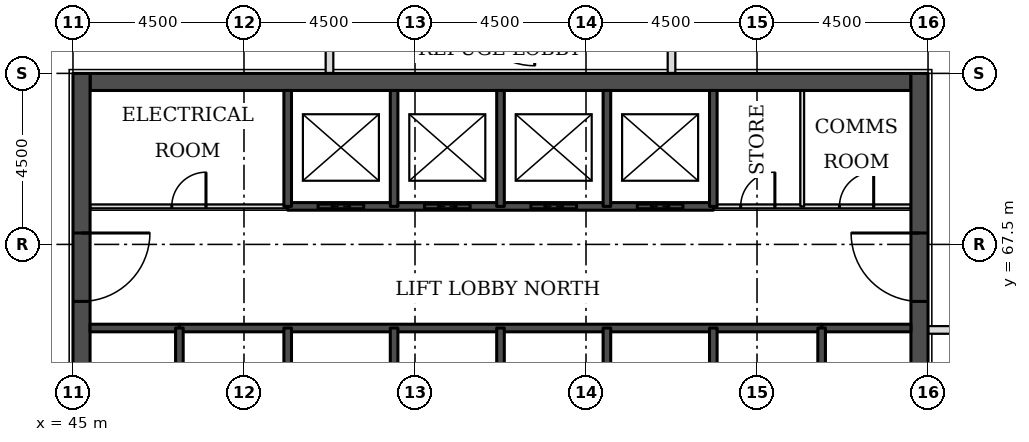
"""IFC4 building model, lengths in metres.
Left out: names, types, materials, properties, quantities, classifications, styles, units other than length and angle.
Written with IfcOpenShell. Run it as: python <this file> out.ifc"""

import sys

from ifc_helpers import new_model, si_unit, direction, frame, frame_2d, origin, place, context, subcontext, project, spatial, rectangle, extrude, element, fill, save


model = new_model("IFC4")
c1 = context("Model", 3, precision=1e-05, world=origin(), true_north=direction((0.0, 1.0)))
c2 = subcontext(c1, "Body", "Model", "MODEL_VIEW")
j1 = project(units=[si_unit("LENGTHUNIT", "METRE"), si_unit("PLANEANGLEUNIT", "RADIAN")], contexts=[c1])
p1 = place(None, origin())
s1 = spatial("IfcSite", under=j1, at=p1, CompositionType="ELEMENT")
p2 = place(p1, origin())
s2 = spatial("IfcBuilding", under=s1, at=p2, CompositionType="ELEMENT")
p3 = place(p2, frame((0.0, 0.0, 138.1)))
s3 = spatial("IfcBuildingStorey", under=s2, at=p3, CompositionType="ELEMENT", Elevation=138.1)
p4 = place(p3, frame((45.45, 71.775, 0.0), z_axis=(0.0, 0.0, 1.0), x_axis=(1.0, 0.0, 0.0)))
e1 = element("IfcWall", 1, at=p4, inside=s3, PredefinedType="SHEAR", context=c2, shape_type="SweptSolid", body=[
    extrude(rectangle(XDim=21.6, YDim=0.45, at=frame_2d((10.8, 0.0))), origin(), (0.0, 0.0, 1.0), 5.0),
])
p5 = place(p3, frame((45.225, 49.5, 0.0), z_axis=(0.0, 0.0, 1.0), x_axis=(0.0, 1.0, 0.0)))
e2 = element("IfcWall", 2, at=p5, inside=s3, PredefinedType="SHEAR", context=c2, shape_type="SweptSolid", body=[
    extrude(rectangle(XDim=22.5, YDim=0.45, at=frame_2d((11.25, 0.0))), origin(), (0.0, 0.0, 1.0), 5.0),
])
p6 = place(p5, frame((4.2, 0.0, 0.0)))
e3 = element("IfcOpeningElement", 3, at=p6, cuts=e2, PredefinedType="OPENING", context=c2, shape_type="SweptSolid", body=[
    extrude(rectangle(XDim=1.8, YDim=2.1, at=frame_2d((0.9, 1.05))), frame((0.0, 0.235, 0.0), z_axis=(0.0, -1.0, 0.0), x_axis=(1.0, 0.0, 0.0)), (0.0, 0.0, 1.0), 0.47),
])
p7 = place(p5, frame((6.9, 0.0, 0.0)))
e4 = element("IfcOpeningElement", 4, at=p7, cuts=e2, PredefinedType="OPENING", context=c2, shape_type="SweptSolid", body=[
    extrude(rectangle(XDim=1.1, YDim=2.1, at=frame_2d((0.55, 1.05))), frame((0.0, 0.235, 0.0), z_axis=(0.0, -1.0, 0.0), x_axis=(1.0, 0.0, 0.0)), (0.0, 0.0, 1.0), 0.47),
])
p8 = place(p5, frame((13.6, 0.0, 0.0)))
e5 = element("IfcOpeningElement", 5, at=p8, cuts=e2, PredefinedType="OPENING", context=c2, shape_type="SweptSolid", body=[
    extrude(rectangle(XDim=1.1, YDim=2.1, at=frame_2d((0.55, 1.05))), frame((0.0, 0.235, 0.0), z_axis=(0.0, -1.0, 0.0), x_axis=(1.0, 0.0, 0.0)), (0.0, 0.0, 1.0), 0.47),
])
p9 = place(p5, frame((16.5, 0.0, 0.0)))
e6 = element("IfcOpeningElement", 6, at=p9, cuts=e2, PredefinedType="OPENING", context=c2, shape_type="SweptSolid", body=[
    extrude(rectangle(XDim=1.8, YDim=2.1, at=frame_2d((0.9, 1.05))), frame((0.0, 0.235, 0.0), z_axis=(0.0, -1.0, 0.0), x_axis=(1.0, 0.0, 0.0)), (0.0, 0.0, 1.0), 0.47),
])
p10 = place(p3, frame((67.275, 49.5, 0.0), z_axis=(0.0, 0.0, 1.0), x_axis=(0.0, 1.0, 0.0)))
e7 = element("IfcWall", 7, at=p10, inside=s3, PredefinedType="SHEAR", context=c2, shape_type="SweptSolid", body=[
    extrude(rectangle(XDim=22.5, YDim=0.45, at=frame_2d((11.25, 0.0))), origin(), (0.0, 0.0, 1.0), 5.0),
])
p11 = place(p10, frame((4.2, 0.0, 0.0)))
e8 = element("IfcOpeningElement", 8, at=p11, cuts=e7, PredefinedType="OPENING", context=c2, shape_type="SweptSolid", body=[
    extrude(rectangle(XDim=1.8, YDim=2.1, at=frame_2d((0.9, 1.05))), frame((0.0, 0.235, 0.0), z_axis=(0.0, -1.0, 0.0), x_axis=(1.0, 0.0, 0.0)), (0.0, 0.0, 1.0), 0.47),
])
p12 = place(p10, frame((6.9, 0.0, 0.0)))
e9 = element("IfcOpeningElement", 9, at=p12, cuts=e7, PredefinedType="OPENING", context=c2, shape_type="SweptSolid", body=[
    extrude(rectangle(XDim=1.1, YDim=2.1, at=frame_2d((0.55, 1.05))), frame((0.0, 0.235, 0.0), z_axis=(0.0, -1.0, 0.0), x_axis=(1.0, 0.0, 0.0)), (0.0, 0.0, 1.0), 0.47),
])
p13 = place(p10, frame((13.6, 0.0, 0.0)))
e10 = element("IfcOpeningElement", 10, at=p13, cuts=e7, PredefinedType="OPENING", context=c2, shape_type="SweptSolid", body=[
    extrude(rectangle(XDim=1.1, YDim=2.1, at=frame_2d((0.55, 1.05))), frame((0.0, 0.235, 0.0), z_axis=(0.0, -1.0, 0.0), x_axis=(1.0, 0.0, 0.0)), (0.0, 0.0, 1.0), 0.47),
])
p14 = place(p10, frame((16.5, 0.0, 0.0)))
e11 = element("IfcOpeningElement", 11, at=p14, cuts=e7, PredefinedType="OPENING", context=c2, shape_type="SweptSolid", body=[
    extrude(rectangle(XDim=1.8, YDim=2.1, at=frame_2d((0.9, 1.05))), frame((0.0, 0.235, 0.0), z_axis=(0.0, -1.0, 0.0), x_axis=(1.0, 0.0, 0.0)), (0.0, 0.0, 1.0), 0.47),
])
for number, where, z_axis, x_axis in (
    (12, (67.5, 65.25, 0.0), (0.0, 0.0, 1.0), (1.0, 0.0, 0.0)),
    (13, (51.75, 72.0, 0.0), (0.0, 0.0, 1.0), (0.0, 1.0, 0.0)),
    (14, (60.75, 72.0, 0.0), (0.0, 0.0, 1.0), (0.0, 1.0, 0.0)),
):
    element("IfcWall", number, at=place(p3, frame(where, z_axis=z_axis, x_axis=x_axis)), inside=s3, PredefinedType="PARTITIONING", context=c2, shape_type="SweptSolid", body=[
        extrude(rectangle(XDim=2.0, YDim=0.2, at=frame_2d((1.0, 0.0))), origin(), (0.0, 0.0, 1.0), 4.85),
    ])
for number, where, z_axis, x_axis in (
    (15, (45.45, 65.3, 0.0), (0.0, 0.0, 1.0), (1.0, 0.0, 0.0)),
    (16, (64.7, 65.3, 0.0), (0.0, 0.0, 1.0), (1.0, 0.0, 0.0)),
):
    element("IfcWall", number, at=place(p3, frame(where, z_axis=z_axis, x_axis=x_axis)), inside=s3, PredefinedType="SOLIDWALL", context=c2, shape_type="SweptSolid", body=[
        extrude(rectangle(XDim=2.35, YDim=0.2, at=frame_2d((1.175, 0.0))), origin(), (0.0, 0.0, 1.0), 4.85),
    ])
p15 = place(p3, frame((47.8, 65.3, 0.0), z_axis=(0.0, 0.0, 1.0), x_axis=(1.0, 0.0, 0.0)))
e17 = element("IfcWall", 17, at=p15, inside=s3, PredefinedType="SOLIDWALL", context=c2, shape_type="SweptSolid", body=[
    extrude(rectangle(XDim=16.9, YDim=0.2, at=frame_2d((8.45, 0.0))), origin(), (0.0, 0.0, 1.0), 4.85),
])
p16 = place(p3, frame((45.45, 68.5, 0.0), z_axis=(0.0, 0.0, 1.0), x_axis=(1.0, 0.0, 0.0)))
e18 = element("IfcWall", 18, at=p16, inside=s3, PredefinedType="PARTITIONING", context=c2, shape_type="SweptSolid", body=[
    extrude(rectangle(XDim=5.2, YDim=0.1, at=frame_2d((2.6, 0.0))), origin(), (0.0, 0.0, 1.0), 4.85),
])
p17 = place(p16, frame((2.15, 0.0, 0.0)))
e19 = element("IfcOpeningElement", 19, at=p17, cuts=e18, PredefinedType="OPENING", context=c2, shape_type="SweptSolid", body=[
    extrude(rectangle(XDim=0.9, YDim=2.1, at=frame_2d((0.45, 1.05))), frame((0.0, 0.06, 0.0), z_axis=(0.0, -1.0, 0.0), x_axis=(1.0, 0.0, 0.0)), (0.0, 0.0, 1.0), 0.12),
])
p18 = place(p3, frame((61.85, 68.5, 0.0), z_axis=(0.0, 0.0, 1.0), x_axis=(1.0, 0.0, 0.0)))
e20 = element("IfcWall", 20, at=p18, inside=s3, PredefinedType="PARTITIONING", context=c2, shape_type="SweptSolid", body=[
    extrude(rectangle(XDim=5.2, YDim=0.1, at=frame_2d((2.6, 0.0))), origin(), (0.0, 0.0, 1.0), 4.85),
])
p19 = place(p18, frame((3.32, 0.0, 0.0)))
e21 = element("IfcOpeningElement", 21, at=p19, cuts=e20, PredefinedType="OPENING", context=c2, shape_type="SweptSolid", body=[
    extrude(rectangle(XDim=0.9, YDim=2.1, at=frame_2d((0.45, 1.05))), frame((0.0, 0.06, 0.0), z_axis=(0.0, -1.0, 0.0), x_axis=(1.0, 0.0, 0.0)), (0.0, 0.0, 1.0), 0.12),
])
p20 = place(p18, frame((0.72, 0.0, 0.0)))
e22 = element("IfcOpeningElement", 22, at=p20, cuts=e20, PredefinedType="OPENING", context=c2, shape_type="SweptSolid", body=[
    extrude(rectangle(XDim=0.9, YDim=2.1, at=frame_2d((0.45, 1.05))), frame((0.0, 0.06, 0.0), z_axis=(0.0, -1.0, 0.0), x_axis=(1.0, 0.0, 0.0)), (0.0, 0.0, 1.0), 0.12),
])
p21 = place(p3, frame((50.65, 68.5, 0.0), z_axis=(0.0, 0.0, 1.0), x_axis=(1.0, 0.0, 0.0)))
e23 = element("IfcWall", 23, at=p21, inside=s3, PredefinedType="SOLIDWALL", context=c2, shape_type="SweptSolid", body=[
    extrude(rectangle(XDim=11.2, YDim=0.2, at=frame_2d((5.6, 0.0))), origin(), (0.0, 0.0, 1.0), 4.85),
])
p22 = place(p21, frame((0.8, 0.0, 0.0)))
e24 = element("IfcOpeningElement", 24, at=p22, cuts=e23, PredefinedType="OPENING", context=c2, shape_type="SweptSolid", body=[
    extrude(rectangle(XDim=1.2, YDim=2.1, at=frame_2d((0.6, 1.05))), frame((0.0, 0.11, 0.0), z_axis=(0.0, -1.0, 0.0), x_axis=(1.0, 0.0, 0.0)), (0.0, 0.0, 1.0), 0.22),
])
p23 = place(p21, frame((3.6, 0.0, 0.0)))
e25 = element("IfcOpeningElement", 25, at=p23, cuts=e23, PredefinedType="OPENING", context=c2, shape_type="SweptSolid", body=[
    extrude(rectangle(XDim=1.2, YDim=2.1, at=frame_2d((0.6, 1.05))), frame((0.0, 0.11, 0.0), z_axis=(0.0, -1.0, 0.0), x_axis=(1.0, 0.0, 0.0)), (0.0, 0.0, 1.0), 0.22),
])
p24 = place(p21, frame((6.4, 0.0, 0.0)))
e26 = element("IfcOpeningElement", 26, at=p24, cuts=e23, PredefinedType="OPENING", context=c2, shape_type="SweptSolid", body=[
    extrude(rectangle(XDim=1.2, YDim=2.1, at=frame_2d((0.6, 1.05))), frame((0.0, 0.11, 0.0), z_axis=(0.0, -1.0, 0.0), x_axis=(1.0, 0.0, 0.0)), (0.0, 0.0, 1.0), 0.22),
])
p25 = place(p21, frame((9.2, 0.0, 0.0)))
e27 = element("IfcOpeningElement", 27, at=p25, cuts=e23, PredefinedType="OPENING", context=c2, shape_type="SweptSolid", body=[
    extrude(rectangle(XDim=1.2, YDim=2.1, at=frame_2d((0.6, 1.05))), frame((0.0, 0.11, 0.0), z_axis=(0.0, -1.0, 0.0), x_axis=(1.0, 0.0, 0.0)), (0.0, 0.0, 1.0), 0.22),
])
p26 = place(p3, frame((47.8, 62.0, 0.0), z_axis=(0.0, 0.0, 1.0), x_axis=(0.0, 1.0, 0.0)))
e28 = element("IfcWall", 28, at=p26, inside=s3, PredefinedType="SOLIDWALL", context=c2, shape_type="SweptSolid", body=[
    extrude(rectangle(XDim=3.3, YDim=0.2, at=frame_2d((1.65, 0.0))), origin(), (0.0, 0.0, 1.0), 4.85),
])
p27 = place(p26, frame((1.1, 0.0, 0.0)))
e29 = element("IfcOpeningElement", 29, at=p27, cuts=e28, PredefinedType="OPENING", context=c2, shape_type="SweptSolid", body=[
    extrude(rectangle(XDim=1.1, YDim=2.1, at=frame_2d((0.55, 1.05))), frame((0.0, 0.11, 0.0), z_axis=(0.0, -1.0, 0.0), x_axis=(1.0, 0.0, 0.0)), (0.0, 0.0, 1.0), 0.22),
])
p28 = place(p3, frame((50.65, 62.0, 0.0), z_axis=(0.0, 0.0, 1.0), x_axis=(0.0, 1.0, 0.0)))
e30 = element("IfcWall", 30, at=p28, inside=s3, PredefinedType="SOLIDWALL", context=c2, shape_type="SweptSolid", body=[
    extrude(rectangle(XDim=3.3, YDim=0.2, at=frame_2d((1.65, 0.0))), origin(), (0.0, 0.0, 1.0), 4.85),
])
p29 = place(p3, frame((50.65, 68.5, 0.0), z_axis=(0.0, 0.0, 1.0), x_axis=(0.0, 1.0, 0.0)))
e31 = element("IfcWall", 31, at=p29, inside=s3, PredefinedType="SOLIDWALL", context=c2, shape_type="SweptSolid", body=[
    extrude(rectangle(XDim=3.05, YDim=0.2, at=frame_2d((1.525, 0.0))), origin(), (0.0, 0.0, 1.0), 4.85),
])
p30 = place(p3, frame((53.45, 62.5, 0.0), z_axis=(0.0, 0.0, 1.0), x_axis=(0.0, 1.0, 0.0)))
e32 = element("IfcWall", 32, at=p30, inside=s3, PredefinedType="SOLIDWALL", context=c2, shape_type="SweptSolid", body=[
    extrude(rectangle(XDim=2.8, YDim=0.2, at=frame_2d((1.4, 0.0))), origin(), (0.0, 0.0, 1.0), 4.85),
])
p31 = place(p3, frame((53.45, 68.5, 0.0), z_axis=(0.0, 0.0, 1.0), x_axis=(0.0, 1.0, 0.0)))
e33 = element("IfcWall", 33, at=p31, inside=s3, PredefinedType="SOLIDWALL", context=c2, shape_type="SweptSolid", body=[
    extrude(rectangle(XDim=3.05, YDim=0.2, at=frame_2d((1.525, 0.0))), origin(), (0.0, 0.0, 1.0), 4.85),
])
p32 = place(p3, frame((56.25, 62.5, 0.0), z_axis=(0.0, 0.0, 1.0), x_axis=(0.0, 1.0, 0.0)))
e34 = element("IfcWall", 34, at=p32, inside=s3, PredefinedType="SOLIDWALL", context=c2, shape_type="SweptSolid", body=[
    extrude(rectangle(XDim=2.8, YDim=0.2, at=frame_2d((1.4, 0.0))), origin(), (0.0, 0.0, 1.0), 4.85),
])
p33 = place(p3, frame((56.25, 68.5, 0.0), z_axis=(0.0, 0.0, 1.0), x_axis=(0.0, 1.0, 0.0)))
e35 = element("IfcWall", 35, at=p33, inside=s3, PredefinedType="SOLIDWALL", context=c2, shape_type="SweptSolid", body=[
    extrude(rectangle(XDim=3.05, YDim=0.2, at=frame_2d((1.525, 0.0))), origin(), (0.0, 0.0, 1.0), 4.85),
])
p34 = place(p3, frame((59.05, 62.5, 0.0), z_axis=(0.0, 0.0, 1.0), x_axis=(0.0, 1.0, 0.0)))
e36 = element("IfcWall", 36, at=p34, inside=s3, PredefinedType="SOLIDWALL", context=c2, shape_type="SweptSolid", body=[
    extrude(rectangle(XDim=2.8, YDim=0.2, at=frame_2d((1.4, 0.0))), origin(), (0.0, 0.0, 1.0), 4.85),
])
p35 = place(p3, frame((59.05, 68.5, 0.0), z_axis=(0.0, 0.0, 1.0), x_axis=(0.0, 1.0, 0.0)))
e37 = element("IfcWall", 37, at=p35, inside=s3, PredefinedType="SOLIDWALL", context=c2, shape_type="SweptSolid", body=[
    extrude(rectangle(XDim=3.05, YDim=0.2, at=frame_2d((1.525, 0.0))), origin(), (0.0, 0.0, 1.0), 4.85),
])
p36 = place(p3, frame((61.85, 62.0, 0.0), z_axis=(0.0, 0.0, 1.0), x_axis=(0.0, 1.0, 0.0)))
e38 = element("IfcWall", 38, at=p36, inside=s3, PredefinedType="SOLIDWALL", context=c2, shape_type="SweptSolid", body=[
    extrude(rectangle(XDim=3.3, YDim=0.2, at=frame_2d((1.65, 0.0))), origin(), (0.0, 0.0, 1.0), 4.85),
])
p37 = place(p3, frame((61.85, 68.5, 0.0), z_axis=(0.0, 0.0, 1.0), x_axis=(0.0, 1.0, 0.0)))
e39 = element("IfcWall", 39, at=p37, inside=s3, PredefinedType="SOLIDWALL", context=c2, shape_type="SweptSolid", body=[
    extrude(rectangle(XDim=3.05, YDim=0.2, at=frame_2d((1.525, 0.0))), origin(), (0.0, 0.0, 1.0), 4.85),
])
p38 = place(p3, frame((64.19, 68.5, 0.0), z_axis=(0.0, 0.0, 1.0), x_axis=(0.0, 1.0, 0.0)))
e40 = element("IfcWall", 40, at=p38, inside=s3, PredefinedType="PARTITIONING", context=c2, shape_type="SweptSolid", body=[
    extrude(rectangle(XDim=3.05, YDim=0.1, at=frame_2d((1.525, 0.0))), origin(), (0.0, 0.0, 1.0), 4.85),
])
p39 = place(p3, frame((64.7, 62.0, 0.0), z_axis=(0.0, 0.0, 1.0), x_axis=(0.0, 1.0, 0.0)))
e41 = element("IfcWall", 41, at=p39, inside=s3, PredefinedType="SOLIDWALL", context=c2, shape_type="SweptSolid", body=[
    extrude(rectangle(XDim=3.3, YDim=0.2, at=frame_2d((1.65, 0.0))), origin(), (0.0, 0.0, 1.0), 4.85),
])
p40 = place(p39, frame((1.1, 0.0, 0.0)))
e42 = element("IfcOpeningElement", 42, at=p40, cuts=e41, PredefinedType="OPENING", context=c2, shape_type="SweptSolid", body=[
    extrude(rectangle(XDim=1.1, YDim=2.1, at=frame_2d((0.55, 1.05))), frame((0.0, 0.11, 0.0), z_axis=(0.0, -1.0, 0.0), x_axis=(1.0, 0.0, 0.0)), (0.0, 0.0, 1.0), 0.22),
])
p41 = place(p22, origin())
e43 = element("IfcDoor", 43, at=p41, inside=s3, OperationType="DOUBLE_DOOR_SLIDING", PredefinedType="DOOR", context=c2, shape_type="SweptSolid", body=[
    extrude(rectangle(XDim=1.2, YDim=2.1, at=frame_2d((0.6, 1.05))), frame((0.0, 0.025, 0.0), z_axis=(0.0, -1.0, 0.0), x_axis=(1.0, 0.0, 0.0)), (0.0, 0.0, 1.0), 0.05),
])
fill(e24, e43)
p42 = place(p23, origin())
e44 = element("IfcDoor", 44, at=p42, inside=s3, OperationType="DOUBLE_DOOR_SLIDING", PredefinedType="DOOR", context=c2, shape_type="SweptSolid", body=[
    extrude(rectangle(XDim=1.2, YDim=2.1, at=frame_2d((0.6, 1.05))), frame((0.0, 0.025, 0.0), z_axis=(0.0, -1.0, 0.0), x_axis=(1.0, 0.0, 0.0)), (0.0, 0.0, 1.0), 0.05),
])
fill(e25, e44)
p43 = place(p24, origin())
e45 = element("IfcDoor", 45, at=p43, inside=s3, OperationType="DOUBLE_DOOR_SLIDING", PredefinedType="DOOR", context=c2, shape_type="SweptSolid", body=[
    extrude(rectangle(XDim=1.2, YDim=2.1, at=frame_2d((0.6, 1.05))), frame((0.0, 0.025, 0.0), z_axis=(0.0, -1.0, 0.0), x_axis=(1.0, 0.0, 0.0)), (0.0, 0.0, 1.0), 0.05),
])
fill(e26, e45)
p44 = place(p25, origin())
e46 = element("IfcDoor", 46, at=p44, inside=s3, OperationType="DOUBLE_DOOR_SLIDING", PredefinedType="DOOR", context=c2, shape_type="SweptSolid", body=[
    extrude(rectangle(XDim=1.2, YDim=2.1, at=frame_2d((0.6, 1.05))), frame((0.0, 0.025, 0.0), z_axis=(0.0, -1.0, 0.0), x_axis=(1.0, 0.0, 0.0)), (0.0, 0.0, 1.0), 0.05),
])
fill(e27, e46)
p45 = place(p9, frame((1.8, 0.0, 0.0), z_axis=(0.0, 0.0, 1.0), x_axis=(-1.0, 0.0, 0.0)))
e47 = element("IfcDoor", 47, at=p45, inside=s3, OperationType="SINGLE_SWING_LEFT", PredefinedType="DOOR", context=c2, shape_type="SweptSolid", body=[
    extrude(rectangle(XDim=1.8, YDim=2.1, at=frame_2d((0.9, 1.05))), frame((0.0, 0.025, 0.0), z_axis=(0.0, -1.0, 0.0), x_axis=(1.0, 0.0, 0.0)), (0.0, 0.0, 1.0), 0.05),
])
fill(e6, e47)
p46 = place(p14, origin())
e48 = element("IfcDoor", 48, at=p46, inside=s3, OperationType="SINGLE_SWING_RIGHT", PredefinedType="DOOR", context=c2, shape_type="SweptSolid", body=[
    extrude(rectangle(XDim=1.8, YDim=2.1, at=frame_2d((0.9, 1.05))), frame((0.0, 0.025, 0.0), z_axis=(0.0, -1.0, 0.0), x_axis=(1.0, 0.0, 0.0)), (0.0, 0.0, 1.0), 0.05),
])
fill(e11, e48)
p47 = place(p19, origin())
e49 = element("IfcDoor", 49, at=p47, inside=s3, OperationType="SINGLE_SWING_RIGHT", PredefinedType="DOOR", context=c2, shape_type="SweptSolid", body=[
    extrude(rectangle(XDim=0.9, YDim=2.1, at=frame_2d((0.45, 1.05))), frame((0.0, 0.025, 0.0), z_axis=(0.0, -1.0, 0.0), x_axis=(1.0, 0.0, 0.0)), (0.0, 0.0, 1.0), 0.05),
])
fill(e21, e49)
p48 = place(p20, origin())
e50 = element("IfcDoor", 50, at=p48, inside=s3, OperationType="SINGLE_SWING_RIGHT", PredefinedType="DOOR", context=c2, shape_type="SweptSolid", body=[
    extrude(rectangle(XDim=0.9, YDim=2.1, at=frame_2d((0.45, 1.05))), frame((0.0, 0.025, 0.0), z_axis=(0.0, -1.0, 0.0), x_axis=(1.0, 0.0, 0.0)), (0.0, 0.0, 1.0), 0.05),
])
fill(e22, e50)
p49 = place(p17, origin())
e51 = element("IfcDoor", 51, at=p49, inside=s3, OperationType="SINGLE_SWING_RIGHT", PredefinedType="DOOR", context=c2, shape_type="SweptSolid", body=[
    extrude(rectangle(XDim=0.9, YDim=2.1, at=frame_2d((0.45, 1.05))), frame((0.0, 0.025, 0.0), z_axis=(0.0, -1.0, 0.0), x_axis=(1.0, 0.0, 0.0)), (0.0, 0.0, 1.0), 0.05),
])
fill(e19, e51)
save(model, sys.argv[1])
